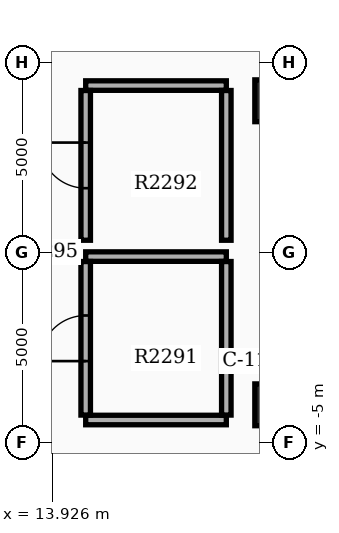
"""IFC4 building model, lengths in metres.
Left out: names, types, materials, properties, quantities, classifications, styles, units other than length and angle.
Written with IfcOpenShell. Run it as: python <this file> out.ifc"""

import sys

from ifc_helpers import new_model, si_unit, direction, frame, frame_2d, origin, origin_2d, place, context, subcontext, project, spatial, rectangle, extrude, element, fill, save


model = new_model("IFC4")
c1 = context("Model", 3, precision=1e-05, world=origin(), true_north=direction((0.0, 1.0)))
c2 = subcontext(c1, "Body", "Model", "MODEL_VIEW")
j1 = project(units=[si_unit("LENGTHUNIT", "METRE"), si_unit("PLANEANGLEUNIT", "RADIAN")], contexts=[c1])
p1 = place(None, origin())
s1 = spatial("IfcSite", under=j1, at=p1, CompositionType="ELEMENT")
p2 = place(p1, origin())
s2 = spatial("IfcBuilding", under=s1, at=p2, CompositionType="ELEMENT")
p3 = place(p2, frame((0.0, 0.0, 143.7)))
s3 = spatial("IfcBuildingStorey", under=s2, at=p3, CompositionType="ELEMENT", Elevation=143.7)
for number, where, z_axis, x_axis in (
    (1, (19.8, -4.0, 0.0), (0.0, 0.0, 1.0), (1.0, 0.0, 0.0)),
    (2, (19.8, 4.0, 0.0), (0.0, 0.0, 1.0), (1.0, 0.0, 0.0)),
):
    element("IfcColumn", number, at=place(p3, frame(where, z_axis=z_axis, x_axis=x_axis)), inside=s3, PredefinedType="COLUMN", context=c2, shape_type="SweptSolid", body=[
        extrude(rectangle(XDim=1.1, YDim=1.1, at=origin_2d()), origin(), (0.0, 0.0, 1.0), 5.1),
    ])
for number, where, z_axis, x_axis in (
    (3, (14.8, -4.4, 0.0), (0.0, 0.0, 1.0), (1.0, 0.0, 0.0)),
    (4, (14.8, -0.1, 0.0), (0.0, 0.0, 1.0), (1.0, 0.0, 0.0)),
):
    element("IfcWall", number, at=place(p3, frame(where, z_axis=z_axis, x_axis=x_axis)), inside=s3, PredefinedType="SOLIDWALL", context=c2, shape_type="SweptSolid", body=[
        extrude(rectangle(XDim=3.7, YDim=0.25, at=frame_2d((1.85, 0.0))), origin(), (0.0, 0.0, 1.0), 3.97),
    ])
p4 = place(p3, frame((14.8, -4.27, 0.0), z_axis=(0.0, 0.0, 1.0), x_axis=(0.0, 1.0, 0.0)))
e5 = element("IfcWall", 5, at=p4, inside=s3, PredefinedType="SOLIDWALL", context=c2, shape_type="SweptSolid", body=[
    extrude(rectangle(XDim=4.04, YDim=0.25, at=frame_2d((2.02, 0.0))), origin(), (0.0, 0.0, 1.0), 3.97),
])
p5 = place(p4, frame((1.42, 0.0, 0.0)))
e6 = element("IfcOpeningElement", 6, at=p5, cuts=e5, PredefinedType="OPENING", context=c2, shape_type="SweptSolid", body=[
    extrude(rectangle(XDim=1.2, YDim=2.15, at=frame_2d((0.6, 1.075))), frame((0.0, 0.135, 0.0), z_axis=(0.0, -1.0, 0.0), x_axis=(1.0, 0.0, 0.0)), (0.0, 0.0, 1.0), 0.27),
])
p6 = place(p3, frame((18.5, -4.27, 0.0), z_axis=(0.0, 0.0, 1.0), x_axis=(0.0, 1.0, 0.0)))
e7 = element("IfcWall", 7, at=p6, inside=s3, PredefinedType="SOLIDWALL", context=c2, shape_type="SweptSolid", body=[
    extrude(rectangle(XDim=4.04, YDim=0.25, at=frame_2d((2.02, 0.0))), origin(), (0.0, 0.0, 1.0), 3.97),
])
p7 = place(p3, frame((14.8, 4.4, 0.0), z_axis=(0.0, 0.0, 1.0), x_axis=(1.0, 0.0, 0.0)))
e8 = element("IfcWall", 8, at=p7, inside=s3, PredefinedType="SOLIDWALL", context=c2, shape_type="SweptSolid", body=[
    extrude(rectangle(XDim=3.7, YDim=0.25, at=frame_2d((1.85, 0.0))), origin(), (0.0, 0.0, 1.0), 3.97),
])
p8 = place(p3, frame((14.8, 0.33, 0.0), z_axis=(0.0, 0.0, 1.0), x_axis=(0.0, 1.0, 0.0)))
e9 = element("IfcWall", 9, at=p8, inside=s3, PredefinedType="SOLIDWALL", context=c2, shape_type="SweptSolid", body=[
    extrude(rectangle(XDim=3.94, YDim=0.25, at=frame_2d((1.97, 0.0))), origin(), (0.0, 0.0, 1.0), 3.97),
])
p9 = place(p8, frame((1.37, 0.0, 0.0)))
e10 = element("IfcOpeningElement", 10, at=p9, cuts=e9, PredefinedType="OPENING", context=c2, shape_type="SweptSolid", body=[
    extrude(rectangle(XDim=1.2, YDim=2.15, at=frame_2d((0.6, 1.075))), frame((0.0, 0.135, 0.0), z_axis=(0.0, -1.0, 0.0), x_axis=(1.0, 0.0, 0.0)), (0.0, 0.0, 1.0), 0.27),
])
p10 = place(p3, frame((18.5, 0.33, 0.0), z_axis=(0.0, 0.0, 1.0), x_axis=(0.0, 1.0, 0.0)))
e11 = element("IfcWall", 11, at=p10, inside=s3, PredefinedType="SOLIDWALL", context=c2, shape_type="SweptSolid", body=[
    extrude(rectangle(XDim=3.94, YDim=0.25, at=frame_2d((1.97, 0.0))), origin(), (0.0, 0.0, 1.0), 3.97),
])
p11 = place(p5, origin())
e12 = element("IfcDoor", 12, at=p11, inside=s3, OperationType="SINGLE_SWING_LEFT", PredefinedType="DOOR", context=c2, shape_type="SweptSolid", body=[
    extrude(rectangle(XDim=1.2, YDim=2.15, at=frame_2d((0.6, 1.075))), frame((0.0, 0.025, 0.0), z_axis=(0.0, -1.0, 0.0), x_axis=(1.0, 0.0, 0.0)), (0.0, 0.0, 1.0), 0.05),
])
fill(e6, e12)
p12 = place(p9, origin())
e13 = element("IfcDoor", 13, at=p12, inside=s3, OperationType="SINGLE_SWING_RIGHT", PredefinedType="DOOR", context=c2, shape_type="SweptSolid", body=[
    extrude(rectangle(XDim=1.2, YDim=2.15, at=frame_2d((0.6, 1.075))), frame((0.0, 0.025, 0.0), z_axis=(0.0, -1.0, 0.0), x_axis=(1.0, 0.0, 0.0)), (0.0, 0.0, 1.0), 0.05),
])
fill(e10, e13)
save(model, sys.argv[1])
